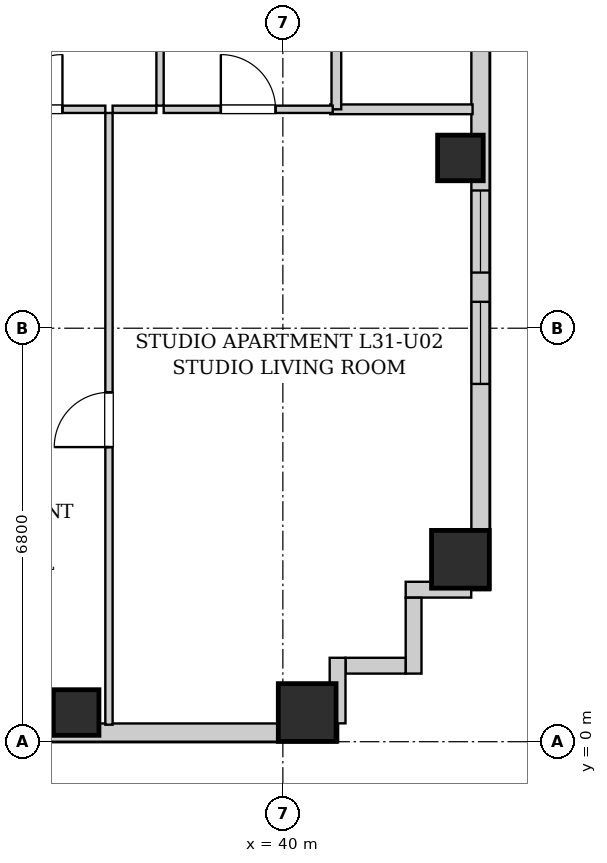
"""IFC4 building model, lengths in metres.
Left out: names, types, materials, properties, quantities, classifications, styles, units other than length and angle.
Written with IfcOpenShell. Run it as: python <this file> out.ifc"""

import sys

from ifc_helpers import new_model, si_unit, direction, frame, frame_2d, origin, origin_2d, place, context, subcontext, project, spatial, rectangle, extrude, element, fill, save


model = new_model("IFC4")
c1 = context("Model", 3, precision=1e-05, world=origin(), true_north=direction((0.0, 1.0)))
c2 = subcontext(c1, "Body", "Model", "MODEL_VIEW")
j1 = project(units=[si_unit("LENGTHUNIT", "METRE"), si_unit("PLANEANGLEUNIT", "RADIAN")], contexts=[c1])
p1 = place(None, origin())
s1 = spatial("IfcSite", under=j1, at=p1, CompositionType="ELEMENT")
p2 = place(p1, origin())
s2 = spatial("IfcBuilding", under=s1, at=p2, CompositionType="ELEMENT")
p3 = place(p2, frame((0.0, 0.0, 110.3)))
s3 = spatial("IfcBuildingStorey", under=s2, at=p3, CompositionType="ELEMENT", Elevation=110.3)
p4 = place(p3, frame((36.6, 0.48, 0.0), z_axis=(0.0, 0.0, 1.0), x_axis=(1.0, 0.0, 0.0)))
e1 = element("IfcColumn", 1, at=p4, inside=s3, PredefinedType="COLUMN", context=c2, shape_type="SweptSolid", body=[
    extrude(rectangle(XDim=0.75, YDim=0.75, at=origin_2d()), origin(), (0.0, 0.0, 1.0), 3.2),
])
for number, where, z_axis, x_axis in (
    (2, (40.4, 0.48, 0.0), (0.0, 0.0, 1.0), (1.0, 0.0, 0.0)),
    (3, (42.92, 3.0, 0.0), (0.0, 0.0, 1.0), (1.0, 0.0, 0.0)),
):
    element("IfcColumn", number, at=place(p3, frame(where, z_axis=z_axis, x_axis=x_axis)), inside=s3, PredefinedType="COLUMN", context=c2, shape_type="SweptSolid", body=[
        extrude(rectangle(XDim=0.95, YDim=0.95, at=origin_2d()), origin(), (0.0, 0.0, 1.0), 3.2),
    ])
p5 = place(p3, frame((42.92, 9.6, 0.0), z_axis=(0.0, 0.0, 1.0), x_axis=(1.0, 0.0, 0.0)))
e4 = element("IfcColumn", 4, at=p5, inside=s3, PredefinedType="COLUMN", context=c2, shape_type="SweptSolid", body=[
    extrude(rectangle(XDim=0.75, YDim=0.75, at=origin_2d()), origin(), (0.0, 0.0, 1.0), 3.2),
])
p6 = place(p3, frame((43.25, 24.6, 0.0), z_axis=(0.0, 0.0, 1.0), x_axis=(0.0, -1.0, 0.0)))
e5 = element("IfcWall", 5, at=p6, inside=s3, PredefinedType="SOLIDWALL", context=c2, shape_type="SweptSolid", body=[
    extrude(rectangle(XDim=22.1, YDim=0.3, at=frame_2d((11.05, 0.0))), origin(), (0.0, 0.0, 1.0), 2.94),
])
p7 = place(p6, frame((17.366, 0.0, 0.55)))
e6 = element("IfcOpeningElement", 6, at=p7, cuts=e5, PredefinedType="OPENING", context=c2, shape_type="SweptSolid", body=[
    extrude(rectangle(XDim=1.35, YDim=1.2, at=frame_2d((0.675, 0.6))), frame((0.0, 0.16, 0.0), z_axis=(0.0, -1.0, 0.0), x_axis=(1.0, 0.0, 0.0)), (0.0, 0.0, 1.0), 0.32),
])
p8 = place(p6, frame((15.535, 0.0, 0.55)))
e7 = element("IfcOpeningElement", 7, at=p8, cuts=e5, PredefinedType="OPENING", context=c2, shape_type="SweptSolid", body=[
    extrude(rectangle(XDim=1.35, YDim=1.2, at=frame_2d((0.675, 0.6))), frame((0.0, 0.16, 0.0), z_axis=(0.0, -1.0, 0.0), x_axis=(1.0, 0.0, 0.0)), (0.0, 0.0, 1.0), 0.32),
])
p9 = place(p6, frame((5.1, 0.0, 0.55)))
e8 = element("IfcOpeningElement", 8, at=p9, cuts=e5, PredefinedType="OPENING", context=c2, shape_type="SweptSolid", body=[
    extrude(rectangle(XDim=1.35, YDim=1.2, at=frame_2d((0.675, 0.6))), frame((0.0, 0.16, 0.0), z_axis=(0.0, -1.0, 0.0), x_axis=(1.0, 0.0, 0.0)), (0.0, 0.0, 1.0), 0.32),
])
p10 = place(p6, frame((6.71, 0.0, 0.55)))
e9 = element("IfcOpeningElement", 9, at=p10, cuts=e5, PredefinedType="OPENING", context=c2, shape_type="SweptSolid", body=[
    extrude(rectangle(XDim=1.35, YDim=1.2, at=frame_2d((0.675, 0.6))), frame((0.0, 0.16, 0.0), z_axis=(0.0, -1.0, 0.0), x_axis=(1.0, 0.0, 0.0)), (0.0, 0.0, 1.0), 0.32),
])
p11 = place(p3, frame((40.9, 0.15, 0.0), z_axis=(0.0, 0.0, 1.0), x_axis=(-1.0, 0.0, 0.0)))
e10 = element("IfcWall", 10, at=p11, inside=s3, PredefinedType="SOLIDWALL", context=c2, shape_type="SweptSolid", body=[
    extrude(rectangle(XDim=21.95, YDim=0.3, at=frame_2d((10.975, 0.0))), origin(), (0.0, 0.0, 1.0), 2.94),
])
p12 = place(p11, frame((20.08, 0.0, 0.55)))
e11 = element("IfcOpeningElement", 11, at=p12, cuts=e10, PredefinedType="OPENING", context=c2, shape_type="SweptSolid", body=[
    extrude(rectangle(XDim=1.35, YDim=1.2, at=frame_2d((0.675, 0.6))), frame((0.0, 0.16, 0.0), z_axis=(0.0, -1.0, 0.0), x_axis=(1.0, 0.0, 0.0)), (0.0, 0.0, 1.0), 0.32),
])
p13 = place(p11, frame((18.4, 0.0, 0.55)))
e12 = element("IfcOpeningElement", 12, at=p13, cuts=e10, PredefinedType="OPENING", context=c2, shape_type="SweptSolid", body=[
    extrude(rectangle(XDim=0.85, YDim=1.2, at=frame_2d((0.425, 0.6))), frame((0.0, 0.16, 0.0), z_axis=(0.0, -1.0, 0.0), x_axis=(1.0, 0.0, 0.0)), (0.0, 0.0, 1.0), 0.32),
])
p14 = place(p11, frame((11.127, 0.0, 0.55)))
e13 = element("IfcOpeningElement", 13, at=p14, cuts=e10, PredefinedType="OPENING", context=c2, shape_type="SweptSolid", body=[
    extrude(rectangle(XDim=1.35, YDim=1.2, at=frame_2d((0.675, 0.6))), frame((0.0, 0.16, 0.0), z_axis=(0.0, -1.0, 0.0), x_axis=(1.0, 0.0, 0.0)), (0.0, 0.0, 1.0), 0.32),
])
p15 = place(p11, frame((8.235, 0.0, 0.55)))
e14 = element("IfcOpeningElement", 14, at=p15, cuts=e10, PredefinedType="OPENING", context=c2, shape_type="SweptSolid", body=[
    extrude(rectangle(XDim=1.35, YDim=1.2, at=frame_2d((0.675, 0.6))), frame((0.0, 0.16, 0.0), z_axis=(0.0, -1.0, 0.0), x_axis=(1.0, 0.0, 0.0)), (0.0, 0.0, 1.0), 0.32),
])
p16 = place(p11, frame((4.835, 0.0, 0.55)))
e15 = element("IfcOpeningElement", 15, at=p16, cuts=e10, PredefinedType="OPENING", context=c2, shape_type="SweptSolid", body=[
    extrude(rectangle(XDim=1.35, YDim=1.2, at=frame_2d((0.675, 0.6))), frame((0.0, 0.16, 0.0), z_axis=(0.0, -1.0, 0.0), x_axis=(1.0, 0.0, 0.0)), (0.0, 0.0, 1.0), 0.32),
])
p17 = place(p3, frame((43.098, 2.5, 0.0), z_axis=(0.0, 0.0, 1.0), x_axis=(-1.0, 0.0, 0.0)))
e16 = element("IfcWall", 16, at=p17, inside=s3, PredefinedType="SOLIDWALL", context=c2, shape_type="SweptSolid", body=[
    extrude(rectangle(XDim=1.078, YDim=0.26, at=frame_2d((0.539, 0.0))), origin(), (0.0, 0.0, 1.0), 2.94),
])
p18 = place(p3, frame((42.15, 2.368, 0.0), z_axis=(0.0, 0.0, 1.0), x_axis=(0.0, -1.0, 0.0)))
e17 = element("IfcWall", 17, at=p18, inside=s3, PredefinedType="SOLIDWALL", context=c2, shape_type="SweptSolid", body=[
    extrude(rectangle(XDim=1.248, YDim=0.26, at=frame_2d((0.624, 0.0))), origin(), (0.0, 0.0, 1.0), 2.94),
])
p19 = place(p3, frame((42.018, 1.25, 0.0), z_axis=(0.0, 0.0, 1.0), x_axis=(-1.0, 0.0, 0.0)))
e18 = element("IfcWall", 18, at=p19, inside=s3, PredefinedType="SOLIDWALL", context=c2, shape_type="SweptSolid", body=[
    extrude(rectangle(XDim=0.986, YDim=0.26, at=frame_2d((0.493, 0.0))), origin(), (0.0, 0.0, 1.0), 2.94),
])
p20 = place(p3, frame((40.9, 1.38, 0.0), z_axis=(0.0, 0.0, 1.0), x_axis=(0.0, -1.0, 0.0)))
e19 = element("IfcWall", 19, at=p20, inside=s3, PredefinedType="SOLIDWALL", context=c2, shape_type="SweptSolid", body=[
    extrude(rectangle(XDim=1.078, YDim=0.26, at=frame_2d((0.539, 0.0))), origin(), (0.0, 0.0, 1.0), 2.94),
])
p21 = place(p3, frame((40.78, 10.4, 0.0), z_axis=(0.0, 0.0, 1.0), x_axis=(1.0, 0.0, 0.0)))
e20 = element("IfcWall", 20, at=p21, inside=s3, PredefinedType="PARTITIONING", context=c2, shape_type="SweptSolid", body=[
    extrude(rectangle(XDim=2.34, YDim=0.16, at=frame_2d((1.17, 0.0))), origin(), (0.0, 0.0, 1.0), 2.94),
])
p22 = place(p3, frame((40.88, 10.4, 0.0), z_axis=(0.0, 0.0, 1.0), x_axis=(0.0, 1.0, 0.0)))
e21 = element("IfcWall", 21, at=p22, inside=s3, PredefinedType="PARTITIONING", context=c2, shape_type="SweptSolid", body=[
    extrude(rectangle(XDim=2.91, YDim=0.16, at=frame_2d((1.455, 0.0))), origin(), (0.0, 0.0, 1.0), 2.94),
])
p23 = place(p3, frame((37.98, 10.46, 0.0), z_axis=(0.0, 0.0, 1.0), x_axis=(0.0, 1.0, 0.0)))
e22 = element("IfcWall", 22, at=p23, inside=s3, PredefinedType="PARTITIONING", context=c2, shape_type="SweptSolid", body=[
    extrude(rectangle(XDim=2.85, YDim=0.12, at=frame_2d((1.425, 0.0))), origin(), (0.0, 0.0, 1.0), 2.94),
])
p24 = place(p23, frame((0.975, 0.0, 0.0)))
e23 = element("IfcOpeningElement", 23, at=p24, cuts=e22, PredefinedType="OPENING", context=c2, shape_type="SweptSolid", body=[
    extrude(rectangle(XDim=0.9, YDim=2.05, at=frame_2d((0.45, 1.025))), frame((0.0, 0.07, 0.0), z_axis=(0.0, -1.0, 0.0), x_axis=(1.0, 0.0, 0.0)), (0.0, 0.0, 1.0), 0.14),
])
p25 = place(p3, frame((34.77, 10.4, 0.0), z_axis=(0.0, 0.0, 1.0), x_axis=(1.0, 0.0, 0.0)))
e24 = element("IfcWall", 24, at=p25, inside=s3, PredefinedType="PARTITIONING", context=c2, shape_type="SweptSolid", body=[
    extrude(rectangle(XDim=2.31, YDim=0.12, at=frame_2d((1.155, 0.0))), origin(), (0.0, 0.0, 1.0), 2.94),
])
p26 = place(p25, frame((0.705, 0.0, 0.0)))
e25 = element("IfcOpeningElement", 25, at=p26, cuts=e24, PredefinedType="OPENING", context=c2, shape_type="SweptSolid", body=[
    extrude(rectangle(XDim=0.9, YDim=2.05, at=frame_2d((0.45, 1.025))), frame((0.0, 0.07, 0.0), z_axis=(0.0, -1.0, 0.0), x_axis=(1.0, 0.0, 0.0)), (0.0, 0.0, 1.0), 0.14),
])
p27 = place(p3, frame((37.2, 10.4, 0.0), z_axis=(0.0, 0.0, 1.0), x_axis=(1.0, 0.0, 0.0)))
e26 = element("IfcWall", 26, at=p27, inside=s3, PredefinedType="PARTITIONING", context=c2, shape_type="SweptSolid", body=[
    extrude(rectangle(XDim=0.72, YDim=0.12, at=frame_2d((0.36, 0.0))), origin(), (0.0, 0.0, 1.0), 2.94),
])
p28 = place(p3, frame((38.04, 10.4, 0.0), z_axis=(0.0, 0.0, 1.0), x_axis=(1.0, 0.0, 0.0)))
e27 = element("IfcWall", 27, at=p28, inside=s3, PredefinedType="PARTITIONING", context=c2, shape_type="SweptSolid", body=[
    extrude(rectangle(XDim=2.78, YDim=0.12, at=frame_2d((1.39, 0.0))), origin(), (0.0, 0.0, 1.0), 2.94),
])
p29 = place(p28, frame((0.94, 0.0, 0.0)))
e28 = element("IfcOpeningElement", 28, at=p29, cuts=e27, PredefinedType="OPENING", context=c2, shape_type="SweptSolid", body=[
    extrude(rectangle(XDim=0.9, YDim=2.05, at=frame_2d((0.45, 1.025))), frame((0.0, 0.07, 0.0), z_axis=(0.0, -1.0, 0.0), x_axis=(1.0, 0.0, 0.0)), (0.0, 0.0, 1.0), 0.14),
])
p30 = place(p3, frame((37.14, 0.28, 0.0), z_axis=(0.0, 0.0, 1.0), x_axis=(0.0, 1.0, 0.0)))
e29 = element("IfcWall", 29, at=p30, inside=s3, PredefinedType="PARTITIONING", context=c2, shape_type="SweptSolid", body=[
    extrude(rectangle(XDim=10.06, YDim=0.12, at=frame_2d((5.03, 0.0))), origin(), (0.0, 0.0, 1.0), 2.94),
])
p31 = place(p30, frame((4.565, 0.0, 0.0)))
e30 = element("IfcOpeningElement", 30, at=p31, cuts=e29, PredefinedType="OPENING", context=c2, shape_type="SweptSolid", body=[
    extrude(rectangle(XDim=0.9, YDim=2.05, at=frame_2d((0.45, 1.025))), frame((0.0, 0.07, 0.0), z_axis=(0.0, -1.0, 0.0), x_axis=(1.0, 0.0, 0.0)), (0.0, 0.0, 1.0), 0.14),
])
p32 = place(p26, origin())
e31 = element("IfcDoor", 31, at=p32, inside=s3, OperationType="SINGLE_SWING_RIGHT", PredefinedType="DOOR", context=c2, shape_type="SweptSolid", body=[
    extrude(rectangle(XDim=0.9, YDim=2.05, at=frame_2d((0.45, 1.025))), frame((0.0, 0.025, 0.0), z_axis=(0.0, -1.0, 0.0), x_axis=(1.0, 0.0, 0.0)), (0.0, 0.0, 1.0), 0.05),
])
fill(e25, e31)
p33 = place(p29, origin())
e32 = element("IfcDoor", 32, at=p33, inside=s3, OperationType="SINGLE_SWING_LEFT", PredefinedType="DOOR", context=c2, shape_type="SweptSolid", body=[
    extrude(rectangle(XDim=0.9, YDim=2.05, at=frame_2d((0.45, 1.025))), frame((0.0, 0.025, 0.0), z_axis=(0.0, -1.0, 0.0), x_axis=(1.0, 0.0, 0.0)), (0.0, 0.0, 1.0), 0.05),
])
fill(e28, e32)
p34 = place(p31, origin())
e33 = element("IfcDoor", 33, at=p34, inside=s3, OperationType="SINGLE_SWING_LEFT", PredefinedType="DOOR", context=c2, shape_type="SweptSolid", body=[
    extrude(rectangle(XDim=0.9, YDim=2.05, at=frame_2d((0.45, 1.025))), frame((0.0, 0.025, 0.0), z_axis=(0.0, -1.0, 0.0), x_axis=(1.0, 0.0, 0.0)), (0.0, 0.0, 1.0), 0.05),
])
fill(e30, e33)
p35 = place(p7, origin())
e34 = element("IfcWindow", 34, at=p35, inside=s3, PartitioningType="SINGLE_PANEL", PredefinedType="WINDOW", context=c2, shape_type="SweptSolid", body=[
    extrude(rectangle(XDim=1.35, YDim=1.2, at=frame_2d((0.675, 0.6))), frame((0.0, 0.03, 0.0), z_axis=(0.0, -1.0, 0.0), x_axis=(1.0, 0.0, 0.0)), (0.0, 0.0, 1.0), 0.06),
])
fill(e6, e34)
p36 = place(p8, origin())
e35 = element("IfcWindow", 35, at=p36, inside=s3, PartitioningType="SINGLE_PANEL", PredefinedType="WINDOW", context=c2, shape_type="SweptSolid", body=[
    extrude(rectangle(XDim=1.35, YDim=1.2, at=frame_2d((0.675, 0.6))), frame((0.0, 0.03, 0.0), z_axis=(0.0, -1.0, 0.0), x_axis=(1.0, 0.0, 0.0)), (0.0, 0.0, 1.0), 0.06),
])
fill(e7, e35)
save(model, sys.argv[1])
